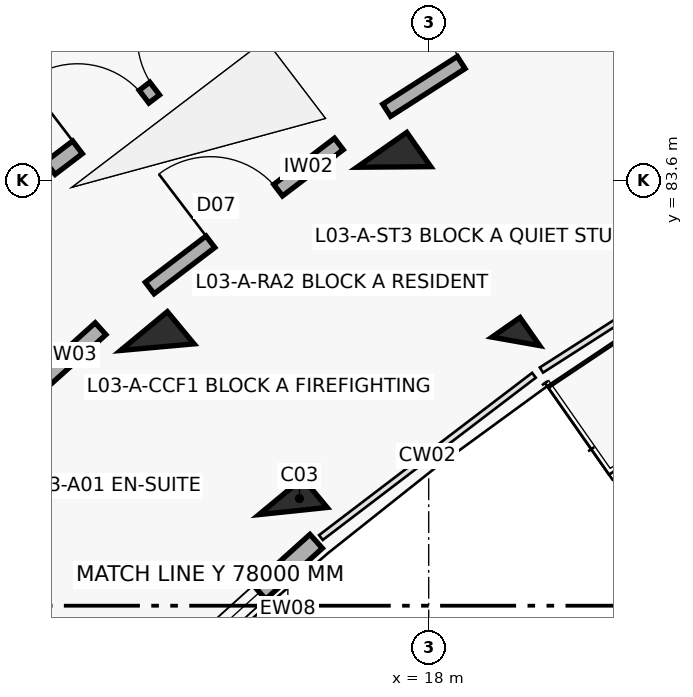
"""IFC4 building model, lengths in metres.
Left out: names, types, materials, properties, quantities, classifications, styles, units other than length and angle.
Written with IfcOpenShell. Run it as: python <this file> out.ifc"""

import sys

from ifc_helpers import new_model, si_unit, direction, frame, frame_2d, origin, origin_2d, place, context, subcontext, project, spatial, rectangle, extrude, element, fill, save


model = new_model("IFC4")
c1 = context("Model", 3, precision=1e-05, world=origin(), true_north=direction((0.0, 1.0)))
c2 = subcontext(c1, "Body", "Model", "MODEL_VIEW")
j1 = project(units=[si_unit("LENGTHUNIT", "METRE"), si_unit("PLANEANGLEUNIT", "RADIAN")], contexts=[c1])
p1 = place(None, origin())
s1 = spatial("IfcSite", under=j1, at=p1, CompositionType="ELEMENT")
p2 = place(p1, origin())
s2 = spatial("IfcBuilding", under=s1, at=p2, CompositionType="ELEMENT")
p3 = place(p2, frame((0.0, 0.0, 11.2)))
s3 = spatial("IfcBuildingStorey", under=s2, at=p3, CompositionType="ELEMENT", Elevation=11.2)
p4 = place(p3, frame((16.215, 79.245, 0.0), z_axis=(0.0, 0.0, 1.0), x_axis=(-0.637961754089, 0.770068049148, 0.0)))
e1 = element("IfcColumn", 1, at=p4, inside=s3, PredefinedType="COLUMN", context=c2, shape_type="SweptSolid", body=[
    extrude(rectangle(XDim=0.5, YDim=0.75, at=origin_2d()), origin(), (0.0, 0.0, 1.0), 3.1),
])
p5 = place(p3, frame((14.429, 81.402, 0.0), z_axis=(0.0, 0.0, 1.0), x_axis=(-0.637961754089, 0.770068049148, 0.0)))
e2 = element("IfcColumn", 2, at=p5, inside=s3, PredefinedType="COLUMN", context=c2, shape_type="SweptSolid", body=[
    extrude(rectangle(XDim=0.55, YDim=0.8, at=origin_2d()), origin(), (0.0, 0.0, 1.0), 3.1),
])
p6 = place(p3, frame((19.146, 81.478, 0.0), z_axis=(0.0, 0.0, 1.0), x_axis=(-0.573004420611, 0.819552276527, 0.0)))
e3 = element("IfcColumn", 3, at=p6, inside=s3, PredefinedType="COLUMN", context=c2, shape_type="SweptSolid", body=[
    extrude(rectangle(XDim=0.45, YDim=0.45, at=origin_2d()), origin(), (0.0, 0.0, 1.0), 3.1),
])
p7 = place(p3, frame((17.542, 83.773, 0.0), z_axis=(0.0, 0.0, 1.0), x_axis=(-0.573004420611, 0.819552276527, 0.0)))
e4 = element("IfcColumn", 4, at=p7, inside=s3, PredefinedType="COLUMN", context=c2, shape_type="SweptSolid", body=[
    extrude(rectangle(XDim=0.55, YDim=0.8, at=origin_2d()), origin(), (0.0, 0.0, 1.0), 3.1),
])
p8 = place(p3, frame((13.84, 76.437, 0.0), z_axis=(0.0, 0.0, 1.0), x_axis=(0.743385092197, 0.668863666751, 0.0)))
e5 = element("IfcWall", 5, at=p8, inside=s3, PredefinedType="SOLIDWALL", context=c2, shape_type="SweptSolid", body=[
    extrude(rectangle(XDim=3.604, YDim=0.245, at=frame_2d((1.802, 0.0))), origin(), (0.0, 0.0, 1.0), 2.25),
])
p9 = place(p8, frame((1.002, 0.0, 0.32)))
e6 = element("IfcOpeningElement", 6, at=p9, cuts=e5, PredefinedType="OPENING", context=c2, shape_type="SweptSolid", body=[
    extrude(rectangle(XDim=1.6, YDim=1.5, at=frame_2d((0.8, 0.75))), frame((0.0, 0.133, 0.0), z_axis=(0.0, -1.0, 0.0), x_axis=(1.0, 0.0, 0.0)), (0.0, 0.0, 1.0), 0.265),
])
p10 = place(p3, frame((11.357, 79.552, 0.0), z_axis=(0.0, 0.0, 1.0), x_axis=(0.743387266925, 0.668861249718, 0.0)))
e7 = element("IfcWall", 7, at=p10, inside=s3, PredefinedType="SOLIDWALL", context=c2, shape_type="SweptSolid", body=[
    extrude(rectangle(XDim=3.128, YDim=0.21, at=frame_2d((1.564, 0.0))), origin(), (0.0, 0.0, 1.0), 2.08),
])
p11 = place(p10, frame((1.014, 0.0, 0.0)))
e8 = element("IfcOpeningElement", 8, at=p11, cuts=e7, PredefinedType="OPENING", context=c2, shape_type="SweptSolid", body=[
    extrude(rectangle(XDim=1.1, YDim=2.15, at=frame_2d((0.55, 1.075))), frame((0.0, 0.115, 0.0), z_axis=(0.0, -1.0, 0.0), x_axis=(1.0, 0.0, 0.0)), (0.0, 0.0, 1.0), 0.23),
])
p12 = place(p3, frame((13.021, 83.759, 0.0), z_axis=(0.0, 0.0, 1.0), x_axis=(0.795498026433, 0.605956178235, 0.0)))
e9 = element("IfcWall", 9, at=p12, inside=s3, PredefinedType="SOLIDWALL", context=c2, shape_type="SweptSolid", body=[
    extrude(rectangle(XDim=3.296, YDim=0.21, at=frame_2d((1.648, 0.0))), origin(), (0.0, 0.0, 1.0), 2.08),
])
p13 = place(p12, frame((0.45, 0.0, 0.0)))
e10 = element("IfcOpeningElement", 10, at=p13, cuts=e9, PredefinedType="OPENING", context=c2, shape_type="SweptSolid", body=[
    extrude(rectangle(XDim=1.1, YDim=2.15, at=frame_2d((0.55, 1.075))), frame((0.0, 0.115, 0.0), z_axis=(0.0, -1.0, 0.0), x_axis=(1.0, 0.0, 0.0)), (0.0, 0.0, 1.0), 0.23),
])
p14 = place(p12, frame((1.726, 0.0, 0.0)))
e11 = element("IfcOpeningElement", 11, at=p14, cuts=e9, PredefinedType="OPENING", context=c2, shape_type="SweptSolid", body=[
    extrude(rectangle(XDim=1.12, YDim=2.15, at=frame_2d((0.56, 1.075))), frame((0.0, 0.115, 0.0), z_axis=(0.0, -1.0, 0.0), x_axis=(1.0, 0.0, 0.0)), (0.0, 0.0, 1.0), 0.23),
])
p15 = place(p3, frame((14.329, 82.18, 0.0), z_axis=(0.0, 0.0, 1.0), x_axis=(0.795501577908, 0.605951515838, 0.0)))
e12 = element("IfcWall", 12, at=p15, inside=s3, PredefinedType="SOLIDWALL", context=c2, shape_type="SweptSolid", body=[
    extrude(rectangle(XDim=3.129, YDim=0.19, at=frame_2d((1.564, 0.0))), origin(), (0.0, 0.0, 1.0), 2.08),
])
p16 = place(p15, frame((1.004, 0.0, 0.0)))
e13 = element("IfcOpeningElement", 13, at=p16, cuts=e12, PredefinedType="OPENING", context=c2, shape_type="SweptSolid", body=[
    extrude(rectangle(XDim=1.12, YDim=2.15, at=frame_2d((0.56, 1.075))), frame((0.0, 0.105, 0.0), z_axis=(0.0, -1.0, 0.0), x_axis=(1.0, 0.0, 0.0)), (0.0, 0.0, 1.0), 0.21),
])
p17 = place(p3, frame((17.447, 84.519, 0.0), z_axis=(0.0, 0.0, 1.0), x_axis=(0.842225276846, 0.539125758095, 0.0)))
e14 = element("IfcWall", 14, at=p17, inside=s3, PredefinedType="SOLIDWALL", context=c2, shape_type="SweptSolid", body=[
    extrude(rectangle(XDim=3.269, YDim=0.19, at=frame_2d((1.634, 0.0))), origin(), (0.0, 0.0, 1.0), 2.08),
])
p18 = place(p17, frame((1.164, 0.0, 0.0)))
e15 = element("IfcOpeningElement", 15, at=p18, cuts=e14, PredefinedType="OPENING", context=c2, shape_type="SweptSolid", body=[
    extrude(rectangle(XDim=0.94, YDim=2.1, at=frame_2d((0.47, 1.05))), frame((0.0, 0.105, 0.0), z_axis=(0.0, -1.0, 0.0), x_axis=(1.0, 0.0, 0.0)), (0.0, 0.0, 1.0), 0.21),
])
p19 = place(p9, origin())
e16 = element("IfcWindow", 16, at=p19, inside=s3, PartitioningType="DOUBLE_PANEL_VERTICAL", PredefinedType="WINDOW", context=c2, shape_type="SweptSolid", body=[
    extrude(rectangle(XDim=1.6, YDim=1.5, at=frame_2d((0.8, 0.75))), frame((0.0, 0.03, 0.0), z_axis=(0.0, -1.0, 0.0), x_axis=(1.0, 0.0, 0.0)), (0.0, 0.0, 1.0), 0.06),
])
fill(e6, e16)
p20 = place(p13, origin())
e17 = element("IfcDoor", 17, at=p20, inside=s3, OperationType="SINGLE_SWING_LEFT", PredefinedType="DOOR", context=c2, shape_type="SweptSolid", body=[
    extrude(rectangle(XDim=1.1, YDim=2.15, at=frame_2d((0.55, 1.075))), frame((0.0, 0.025, 0.0), z_axis=(0.0, -1.0, 0.0), x_axis=(1.0, 0.0, 0.0)), (0.0, 0.0, 1.0), 0.05),
])
fill(e10, e17)
p21 = place(p14, origin())
e18 = element("IfcDoor", 18, at=p21, inside=s3, OperationType="SINGLE_SWING_RIGHT", PredefinedType="DOOR", context=c2, shape_type="SweptSolid", body=[
    extrude(rectangle(XDim=1.12, YDim=2.15, at=frame_2d((0.56, 1.075))), frame((0.0, 0.025, 0.0), z_axis=(0.0, -1.0, 0.0), x_axis=(1.0, 0.0, 0.0)), (0.0, 0.0, 1.0), 0.05),
])
fill(e11, e18)
p22 = place(p16, origin())
e19 = element("IfcDoor", 19, at=p22, inside=s3, OperationType="SINGLE_SWING_LEFT", PredefinedType="DOOR", context=c2, shape_type="SweptSolid", body=[
    extrude(rectangle(XDim=1.12, YDim=2.15, at=frame_2d((0.56, 1.075))), frame((0.0, 0.025, 0.0), z_axis=(0.0, -1.0, 0.0), x_axis=(1.0, 0.0, 0.0)), (0.0, 0.0, 1.0), 0.05),
])
fill(e13, e19)
p23 = place(p18, origin())
e20 = element("IfcDoor", 20, at=p23, inside=s3, OperationType="SINGLE_SWING_RIGHT", PredefinedType="DOOR", context=c2, shape_type="SweptSolid", body=[
    extrude(rectangle(XDim=0.94, YDim=2.1, at=frame_2d((0.47, 1.05))), frame((0.0, 0.025, 0.0), z_axis=(0.0, -1.0, 0.0), x_axis=(1.0, 0.0, 0.0)), (0.0, 0.0, 1.0), 0.05),
])
fill(e15, e20)
save(model, sys.argv[1])
